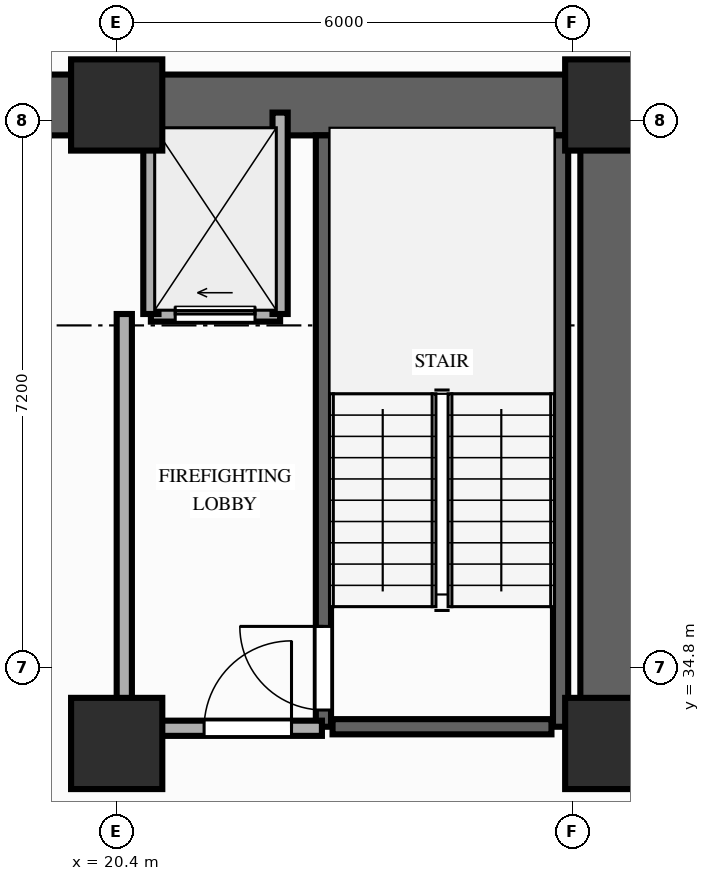
"""IFC4 building model, lengths in metres.
Left out: names, types, materials, properties, quantities, classifications, styles, units other than length and angle.
Written with IfcOpenShell. Run it as: python <this file> out.ifc"""

import sys

from ifc_helpers import new_model, si_unit, direction, frame, frame_2d, origin, origin_2d, place, context, subcontext, project, spatial, rectangle, extrude, element, fill, save


model = new_model("IFC4")
c1 = context("Model", 3, precision=1e-05, world=origin(), true_north=direction((0.0, 1.0)))
c2 = subcontext(c1, "Body", "Model", "MODEL_VIEW")
j1 = project(units=[si_unit("LENGTHUNIT", "METRE"), si_unit("PLANEANGLEUNIT", "RADIAN")], contexts=[c1])
p1 = place(None, origin())
s1 = spatial("IfcSite", under=j1, at=p1, CompositionType="ELEMENT")
p2 = place(p1, origin())
s2 = spatial("IfcBuilding", under=s1, at=p2, CompositionType="ELEMENT")
p3 = place(p2, frame((0.0, 0.0, -7.6)))
s3 = spatial("IfcBuildingStorey", under=s2, at=p3, CompositionType="ELEMENT", Elevation=-7.6)
for number, where, z_axis, x_axis in (
    (1, (20.4, 33.8, 0.0), (0.0, 0.0, 1.0), (1.0, 0.0, 0.0)),
    (2, (26.9, 33.8, 0.0), (0.0, 0.0, 1.0), (1.0, 0.0, 0.0)),
    (3, (20.4, 42.2, 0.0), (0.0, 0.0, 1.0), (1.0, 0.0, 0.0)),
    (4, (26.9, 42.2, 0.0), (0.0, 0.0, 1.0), (1.0, 0.0, 0.0)),
):
    element("IfcColumn", number, at=place(p3, frame(where, z_axis=z_axis, x_axis=x_axis)), inside=s3, PredefinedType="COLUMN", context=c2, shape_type="SweptSolid", body=[
        extrude(rectangle(XDim=1.2, YDim=1.2, at=origin_2d()), origin(), (0.0, 0.0, 1.0), 3.8),
    ])
p4 = place(p3, frame((6.45, 42.2, 0.0), z_axis=(0.0, 0.0, 1.0), x_axis=(1.0, 0.0, 0.0)))
e5 = element("IfcWall", 5, at=p4, inside=s3, PredefinedType="SHEAR", context=c2, shape_type="SweptSolid", body=[
    extrude(rectangle(XDim=20.45, YDim=0.8, at=frame_2d((10.225, 0.0))), origin(), (0.0, 0.0, 1.0), 3.55),
])
p5 = place(p3, frame((26.9, 33.8, 0.0), z_axis=(0.0, 0.0, 1.0), x_axis=(0.0, 1.0, 0.0)))
e6 = element("IfcWall", 6, at=p5, inside=s3, PredefinedType="SHEAR", context=c2, shape_type="SweptSolid", body=[
    extrude(rectangle(XDim=7.95, YDim=0.8, at=frame_2d((3.975, 0.0))), origin(), (0.0, 0.0, 1.0), 3.55),
])
p6 = place(p3, frame((23.12, 34.02, 0.0), z_axis=(0.0, 0.0, 1.0), x_axis=(0.0, 1.0, 0.0)))
e7 = element("IfcWall", 7, at=p6, inside=s3, PredefinedType="SHEAR", context=c2, shape_type="SweptSolid", body=[
    extrude(rectangle(XDim=7.78, YDim=0.2, at=frame_2d((3.89, 0.0))), origin(), (0.0, 0.0, 1.0), 3.55),
])
p7 = place(p6, frame((0.22, 0.0, 0.0)))
e8 = element("IfcOpeningElement", 8, at=p7, cuts=e7, PredefinedType="OPENING", context=c2, shape_type="SweptSolid", body=[
    extrude(rectangle(XDim=1.1, YDim=2.15, at=frame_2d((0.55, 1.075))), frame((0.0, 0.11, 0.0), z_axis=(0.0, -1.0, 0.0), x_axis=(1.0, 0.0, 0.0)), (0.0, 0.0, 1.0), 0.22),
])
p8 = place(p3, frame((26.24, 34.02, 0.0), z_axis=(0.0, 0.0, 1.0), x_axis=(0.0, 1.0, 0.0)))
e9 = element("IfcWall", 9, at=p8, inside=s3, PredefinedType="SHEAR", context=c2, shape_type="SweptSolid", body=[
    extrude(rectangle(XDim=7.78, YDim=0.2, at=frame_2d((3.89, 0.0))), origin(), (0.0, 0.0, 1.0), 3.55),
])
p9 = place(p3, frame((23.24, 34.02, 0.0), z_axis=(0.0, 0.0, 1.0), x_axis=(1.0, 0.0, 0.0)))
e10 = element("IfcWall", 10, at=p9, inside=s3, PredefinedType="SHEAR", context=c2, shape_type="SweptSolid", body=[
    extrude(rectangle(XDim=2.88, YDim=0.2, at=frame_2d((1.44, 0.0))), origin(), (0.0, 0.0, 1.0), 3.55),
])
p10 = place(p3, frame((20.85, 39.45, 0.0), z_axis=(0.0, 0.0, 1.0), x_axis=(1.0, 0.0, 0.0)))
e11 = element("IfcWall", 11, at=p10, inside=s3, PredefinedType="MOVABLE", context=c2, shape_type="SweptSolid", body=[
    extrude(rectangle(XDim=1.7, YDim=0.2, at=frame_2d((0.85, 0.0))), origin(), (0.0, 0.0, 1.0), 3.55),
])
p11 = place(p10, frame((0.32, 0.0, 0.0)))
e12 = element("IfcOpeningElement", 12, at=p11, cuts=e11, PredefinedType="OPENING", context=c2, shape_type="SweptSolid", body=[
    extrude(rectangle(XDim=1.05, YDim=2.15, at=frame_2d((0.525, 1.075))), frame((0.0, 0.11, 0.0), z_axis=(0.0, -1.0, 0.0), x_axis=(1.0, 0.0, 0.0)), (0.0, 0.0, 1.0), 0.22),
])
for number, where, z_axis, x_axis in (
    (13, (20.85, 39.45, 0.0), (0.0, 0.0, 1.0), (0.0, 1.0, 0.0)),
    (14, (22.55, 39.45, 0.0), (0.0, 0.0, 1.0), (0.0, 1.0, 0.0)),
):
    element("IfcWall", number, at=place(p3, frame(where, z_axis=z_axis, x_axis=x_axis)), inside=s3, PredefinedType="MOVABLE", context=c2, shape_type="SweptSolid", body=[
        extrude(rectangle(XDim=2.65, YDim=0.2, at=frame_2d((1.325, 0.0))), origin(), (0.0, 0.0, 1.0), 3.55),
    ])
p12 = place(p3, frame((20.5, 34.0, 0.0), z_axis=(0.0, 0.0, 1.0), x_axis=(0.0, 1.0, 0.0)))
e15 = element("IfcWall", 15, at=p12, inside=s3, PredefinedType="PARTITIONING", context=c2, shape_type="SweptSolid", body=[
    extrude(rectangle(XDim=5.45, YDim=0.2, at=frame_2d((2.725, 0.0))), origin(), (0.0, 0.0, 1.0), 2.72),
])
p13 = place(p3, frame((20.5, 34.0, 0.0), z_axis=(0.0, 0.0, 1.0), x_axis=(1.0, 0.0, 0.0)))
e16 = element("IfcWall", 16, at=p13, inside=s3, PredefinedType="PARTITIONING", context=c2, shape_type="SweptSolid", body=[
    extrude(rectangle(XDim=2.6, YDim=0.2, at=frame_2d((1.3, 0.0))), origin(), (0.0, 0.0, 1.0), 2.72),
])
p14 = place(p13, frame((1.05, 0.0, 0.0)))
e17 = element("IfcOpeningElement", 17, at=p14, cuts=e16, PredefinedType="OPENING", context=c2, shape_type="SweptSolid", body=[
    extrude(rectangle(XDim=1.15, YDim=2.15, at=frame_2d((0.575, 1.075))), frame((0.0, 0.11, 0.0), z_axis=(0.0, -1.0, 0.0), x_axis=(1.0, 0.0, 0.0)), (0.0, 0.0, 1.0), 0.22),
])
p15 = place(p7, origin())
e18 = element("IfcDoor", 18, at=p15, inside=s3, OperationType="SINGLE_SWING_RIGHT", PredefinedType="DOOR", context=c2, shape_type="SweptSolid", body=[
    extrude(rectangle(XDim=1.1, YDim=2.15, at=frame_2d((0.55, 1.075))), frame((0.0, 0.025, 0.0), z_axis=(0.0, -1.0, 0.0), x_axis=(1.0, 0.0, 0.0)), (0.0, 0.0, 1.0), 0.05),
])
fill(e8, e18)
p16 = place(p11, origin())
e19 = element("IfcDoor", 19, at=p16, inside=s3, OperationType="SLIDING_TO_LEFT", PredefinedType="DOOR", context=c2, shape_type="SweptSolid", body=[
    extrude(rectangle(XDim=1.05, YDim=2.15, at=frame_2d((0.525, 1.075))), frame((0.0, 0.025, 0.0), z_axis=(0.0, -1.0, 0.0), x_axis=(1.0, 0.0, 0.0)), (0.0, 0.0, 1.0), 0.05),
])
fill(e12, e19)
p17 = place(p14, origin())
e20 = element("IfcDoor", 20, at=p17, inside=s3, OperationType="SINGLE_SWING_RIGHT", PredefinedType="DOOR", context=c2, shape_type="SweptSolid", body=[
    extrude(rectangle(XDim=1.15, YDim=2.15, at=frame_2d((0.575, 1.075))), frame((0.0, 0.025, 0.0), z_axis=(0.0, -1.0, 0.0), x_axis=(1.0, 0.0, 0.0)), (0.0, 0.0, 1.0), 0.05),
])
fill(e17, e20)
save(model, sys.argv[1])
